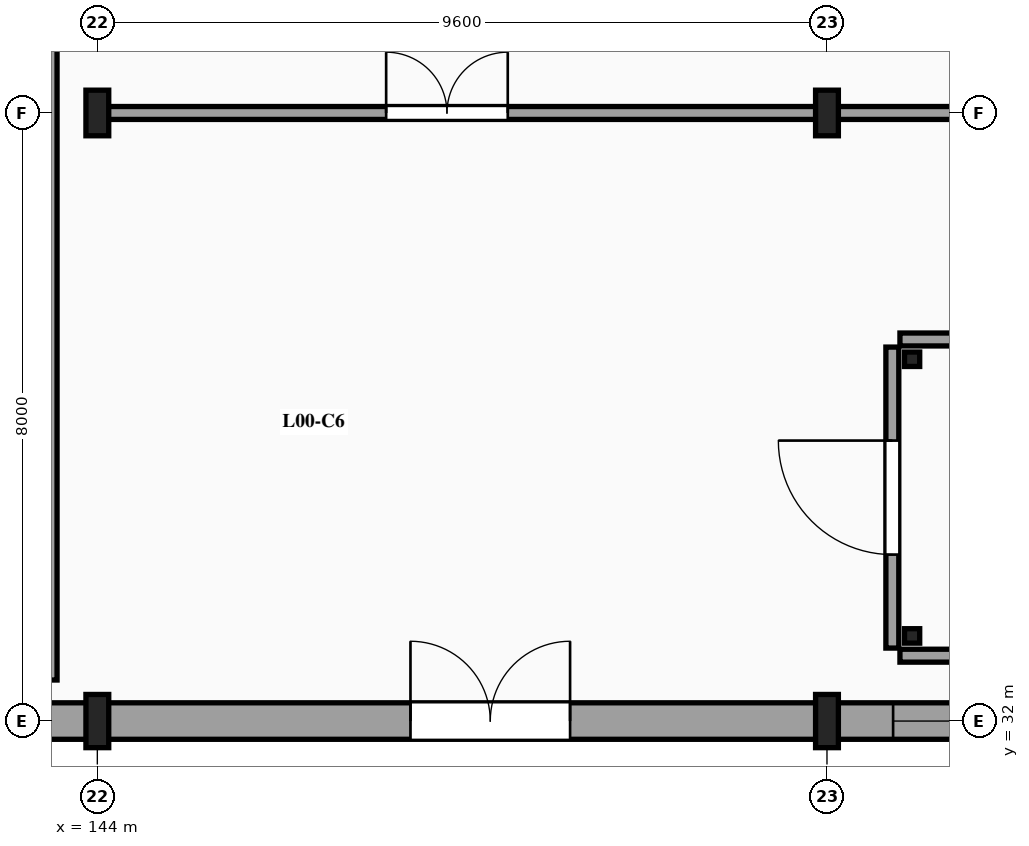
"""IFC4 building model, lengths in metres.
Left out: names, types, materials, properties, quantities, classifications, styles, units other than length and angle.
Written with IfcOpenShell. Run it as: python <this file> out.ifc"""

import sys

from ifc_helpers import new_model, si_unit, direction, frame, frame_2d, origin, origin_2d, place, context, subcontext, project, spatial, rectangle, i_section, extrude, element, fill, save


model = new_model("IFC4")
c1 = context("Model", 3, precision=1e-05, world=origin(), true_north=direction((0.0, 1.0)))
c2 = subcontext(c1, "Body", "Model", "MODEL_VIEW")
j1 = project(units=[si_unit("LENGTHUNIT", "METRE"), si_unit("PLANEANGLEUNIT", "RADIAN")], contexts=[c1])
p1 = place(None, origin())
s1 = spatial("IfcSite", under=j1, at=p1, CompositionType="ELEMENT")
p2 = place(p1, origin())
s2 = spatial("IfcBuilding", under=s1, at=p2, CompositionType="ELEMENT")
p3 = place(p2, origin())
s3 = spatial("IfcBuildingStorey", under=s2, at=p3, CompositionType="ELEMENT", Elevation=0.0)
p4 = place(p3, frame((144.0, 32.0, -0.28), z_axis=(0.0, 0.0, 1.0), x_axis=(1.0, 0.0, 0.0)))
e1 = element("IfcColumn", 1, at=p4, inside=s3, PredefinedType="COLUMN", context=c2, shape_type="SweptSolid", body=[
    extrude(i_section(OverallWidth=0.3, OverallDepth=0.7, WebThickness=0.017, FlangeThickness=0.032, FilletRadius=0.027, at=origin_2d()), origin(), (0.0, 0.0, 1.0), 4.52),
])
p5 = place(p3, frame((144.0, 40.0, -0.28), z_axis=(0.0, 0.0, 1.0), x_axis=(1.0, 0.0, 0.0)))
e2 = element("IfcColumn", 2, at=p5, inside=s3, PredefinedType="COLUMN", context=c2, shape_type="SweptSolid", body=[
    extrude(i_section(OverallWidth=0.3, OverallDepth=0.6, WebThickness=0.015, FlangeThickness=0.03, FilletRadius=0.027, at=origin_2d()), origin(), (0.0, 0.0, 1.0), 4.52),
])
p6 = place(p3, frame((153.6, 32.0, -0.28), z_axis=(0.0, 0.0, 1.0), x_axis=(1.0, 0.0, 0.0)))
e3 = element("IfcColumn", 3, at=p6, inside=s3, PredefinedType="COLUMN", context=c2, shape_type="SweptSolid", body=[
    extrude(i_section(OverallWidth=0.3, OverallDepth=0.7, WebThickness=0.017, FlangeThickness=0.032, FilletRadius=0.027, at=origin_2d()), origin(), (0.0, 0.0, 1.0), 4.52),
])
p7 = place(p3, frame((153.6, 40.0, -0.28), z_axis=(0.0, 0.0, 1.0), x_axis=(1.0, 0.0, 0.0)))
e4 = element("IfcColumn", 4, at=p7, inside=s3, PredefinedType="COLUMN", context=c2, shape_type="SweptSolid", body=[
    extrude(i_section(OverallWidth=0.3, OverallDepth=0.6, WebThickness=0.015, FlangeThickness=0.03, FilletRadius=0.027, at=origin_2d()), origin(), (0.0, 0.0, 1.0), 4.52),
])
for number, where, z_axis, x_axis in (
    (5, (154.72, 33.12, 0.0), (0.0, 0.0, 1.0), (1.0, 0.0, 0.0)),
    (6, (154.72, 36.76, 0.0), (0.0, 0.0, 1.0), (1.0, 0.0, 0.0)),
):
    element("IfcColumn", number, at=place(p3, frame(where, z_axis=z_axis, x_axis=x_axis)), inside=s3, PredefinedType="COLUMN", context=c2, shape_type="SweptSolid", body=[
        extrude(i_section(OverallWidth=0.2, OverallDepth=0.19, WebThickness=0.007, FlangeThickness=0.01, FilletRadius=0.018, at=origin_2d()), origin(), (0.0, 0.0, 1.0), 4.5),
    ])
p8 = place(p3, frame((134.42, 32.0, 0.0), z_axis=(0.0, 0.0, 1.0), x_axis=(1.0, 0.0, 0.0)))
e7 = element("IfcWall", 7, at=p8, inside=s3, PredefinedType="SOLIDWALL", context=c2, shape_type="SweptSolid", body=[
    extrude(rectangle(XDim=9.56, YDim=0.48, at=frame_2d((4.78, 0.0))), origin(), (0.0, 0.0, 1.0), 3.56),
])
p9 = place(p3, frame((144.02, 32.0, 0.0), z_axis=(0.0, 0.0, 1.0), x_axis=(1.0, 0.0, 0.0)))
e8 = element("IfcWall", 8, at=p9, inside=s3, PredefinedType="SOLIDWALL", context=c2, shape_type="SweptSolid", body=[
    extrude(rectangle(XDim=9.56, YDim=0.48, at=frame_2d((4.78, 0.0))), origin(), (0.0, 0.0, 1.0), 3.56),
])
p10 = place(p9, frame((4.1, 0.0, 0.0)))
e9 = element("IfcOpeningElement", 9, at=p10, cuts=e8, PredefinedType="OPENING", context=c2, shape_type="SweptSolid", body=[
    extrude(rectangle(XDim=2.1, YDim=2.4, at=frame_2d((1.05, 1.2))), frame((0.0, 0.25, 0.0), z_axis=(0.0, -1.0, 0.0), x_axis=(1.0, 0.0, 0.0)), (0.0, 0.0, 1.0), 0.5),
])
p11 = place(p3, frame((153.62, 32.0, 0.0), z_axis=(0.0, 0.0, 1.0), x_axis=(1.0, 0.0, 0.0)))
e10 = element("IfcWall", 10, at=p11, inside=s3, PredefinedType="SOLIDWALL", context=c2, shape_type="SweptSolid", body=[
    extrude(rectangle(XDim=9.56, YDim=0.48, at=frame_2d((4.78, 0.0))), origin(), (0.0, 0.0, 1.0), 3.56),
])
p12 = place(p11, frame((0.85, 0.0, 0.85)))
e11 = element("IfcOpeningElement", 11, at=p12, cuts=e10, PredefinedType="OPENING", context=c2, shape_type="SweptSolid", body=[
    extrude(rectangle(XDim=1.6, YDim=2.0, at=frame_2d((0.8, 1.0))), frame((0.0, 0.25, 0.0), z_axis=(0.0, -1.0, 0.0), x_axis=(1.0, 0.0, 0.0)), (0.0, 0.0, 1.0), 0.5),
])
p13 = place(p11, frame((5.95, 0.0, 0.85)))
e12 = element("IfcOpeningElement", 12, at=p13, cuts=e10, PredefinedType="OPENING", context=c2, shape_type="SweptSolid", body=[
    extrude(rectangle(XDim=1.6, YDim=2.0, at=frame_2d((0.8, 1.0))), frame((0.0, 0.25, 0.0), z_axis=(0.0, -1.0, 0.0), x_axis=(1.0, 0.0, 0.0)), (0.0, 0.0, 1.0), 0.5),
])
p14 = place(p3, frame((154.46, 32.96, 0.0), z_axis=(0.0, 0.0, 1.0), x_axis=(0.0, 1.0, 0.0)))
e13 = element("IfcWall", 13, at=p14, inside=s3, PredefinedType="SOLIDWALL", context=c2, shape_type="SweptSolid", body=[
    extrude(rectangle(XDim=3.96, YDim=0.17, at=frame_2d((1.98, 0.0))), origin(), (0.0, 0.0, 1.0), 3.6),
])
p15 = place(p14, frame((1.23, 0.0, 0.0)))
e14 = element("IfcOpeningElement", 14, at=p15, cuts=e13, PredefinedType="OPENING", context=c2, shape_type="SweptSolid", body=[
    extrude(rectangle(XDim=1.5, YDim=2.2, at=frame_2d((0.75, 1.1))), frame((0.0, 0.095, 0.0), z_axis=(0.0, -1.0, 0.0), x_axis=(1.0, 0.0, 0.0)), (0.0, 0.0, 1.0), 0.19),
])
for number, where, z_axis, x_axis in (
    (15, (154.56, 32.86, 0.0), (0.0, 0.0, 1.0), (1.0, 0.0, 0.0)),
    (16, (154.56, 37.02, 0.0), (0.0, 0.0, 1.0), (1.0, 0.0, 0.0)),
):
    element("IfcWall", number, at=place(p3, frame(where, z_axis=z_axis, x_axis=x_axis)), inside=s3, PredefinedType="SOLIDWALL", context=c2, shape_type="SweptSolid", body=[
        extrude(rectangle(XDim=6.84, YDim=0.17, at=frame_2d((3.42, 0.0))), origin(), (0.0, 0.0, 1.0), 3.6),
    ])
p16 = place(p3, frame((144.0, 40.0, 0.0), z_axis=(0.0, 0.0, 1.0), x_axis=(1.0, 0.0, 0.0)))
e17 = element("IfcWall", 17, at=p16, inside=s3, PredefinedType="SOLIDWALL", context=c2, shape_type="SweptSolid", body=[
    extrude(rectangle(XDim=19.0, YDim=0.17, at=frame_2d((9.5, 0.0))), origin(), (0.0, 0.0, 1.0), 3.6),
])
p17 = place(p16, frame((3.8, 0.0, 0.0)))
e18 = element("IfcOpeningElement", 18, at=p17, cuts=e17, PredefinedType="OPENING", context=c2, shape_type="SweptSolid", body=[
    extrude(rectangle(XDim=1.6, YDim=2.25, at=frame_2d((0.8, 1.125))), frame((0.0, 0.095, 0.0), z_axis=(0.0, -1.0, 0.0), x_axis=(1.0, 0.0, 0.0)), (0.0, 0.0, 1.0), 0.19),
])
p18 = place(p3, frame((143.4, 32.54, 0.0), z_axis=(0.0, 0.0, 1.0), x_axis=(0.0, 1.0, 0.0)))
e19 = element("IfcWall", 19, at=p18, inside=s3, PredefinedType="PARTITIONING", context=c2, shape_type="SweptSolid", body=[
    extrude(rectangle(XDim=14.92, YDim=0.14, at=frame_2d((7.46, 0.0))), origin(), (0.0, 0.0, 1.0), 3.6),
])
p19 = place(p10, frame((2.1, 0.0, 0.0), z_axis=(0.0, 0.0, 1.0), x_axis=(-1.0, 0.0, 0.0)))
e20 = element("IfcDoor", 20, at=p19, inside=s3, OperationType="DOUBLE_DOOR_SINGLE_SWING", PredefinedType="DOOR", context=c2, shape_type="SweptSolid", body=[
    extrude(rectangle(XDim=2.1, YDim=2.4, at=frame_2d((1.05, 1.2))), frame((0.0, 0.025, 0.0), z_axis=(0.0, -1.0, 0.0), x_axis=(1.0, 0.0, 0.0)), (0.0, 0.0, 1.0), 0.05),
])
fill(e9, e20)
p20 = place(p12, origin())
e21 = element("IfcWindow", 21, at=p20, inside=s3, PartitioningType="SINGLE_PANEL", PredefinedType="WINDOW", context=c2, shape_type="SweptSolid", body=[
    extrude(rectangle(XDim=1.6, YDim=2.0, at=frame_2d((0.8, 1.0))), frame((0.0, 0.03, 0.0), z_axis=(0.0, -1.0, 0.0), x_axis=(1.0, 0.0, 0.0)), (0.0, 0.0, 1.0), 0.06),
])
fill(e11, e21)
p21 = place(p15, origin())
e22 = element("IfcDoor", 22, at=p21, inside=s3, OperationType="SINGLE_SWING_RIGHT", PredefinedType="DOOR", context=c2, shape_type="SweptSolid", body=[
    extrude(rectangle(XDim=1.5, YDim=2.2, at=frame_2d((0.75, 1.1))), frame((0.0, 0.025, 0.0), z_axis=(0.0, -1.0, 0.0), x_axis=(1.0, 0.0, 0.0)), (0.0, 0.0, 1.0), 0.05),
])
fill(e14, e22)
p22 = place(p17, origin())
e23 = element("IfcDoor", 23, at=p22, inside=s3, OperationType="DOUBLE_DOOR_SINGLE_SWING", PredefinedType="DOOR", context=c2, shape_type="SweptSolid", body=[
    extrude(rectangle(XDim=1.6, YDim=2.25, at=frame_2d((0.8, 1.125))), frame((0.0, 0.025, 0.0), z_axis=(0.0, -1.0, 0.0), x_axis=(1.0, 0.0, 0.0)), (0.0, 0.0, 1.0), 0.05),
])
fill(e18, e23)
save(model, sys.argv[1])
